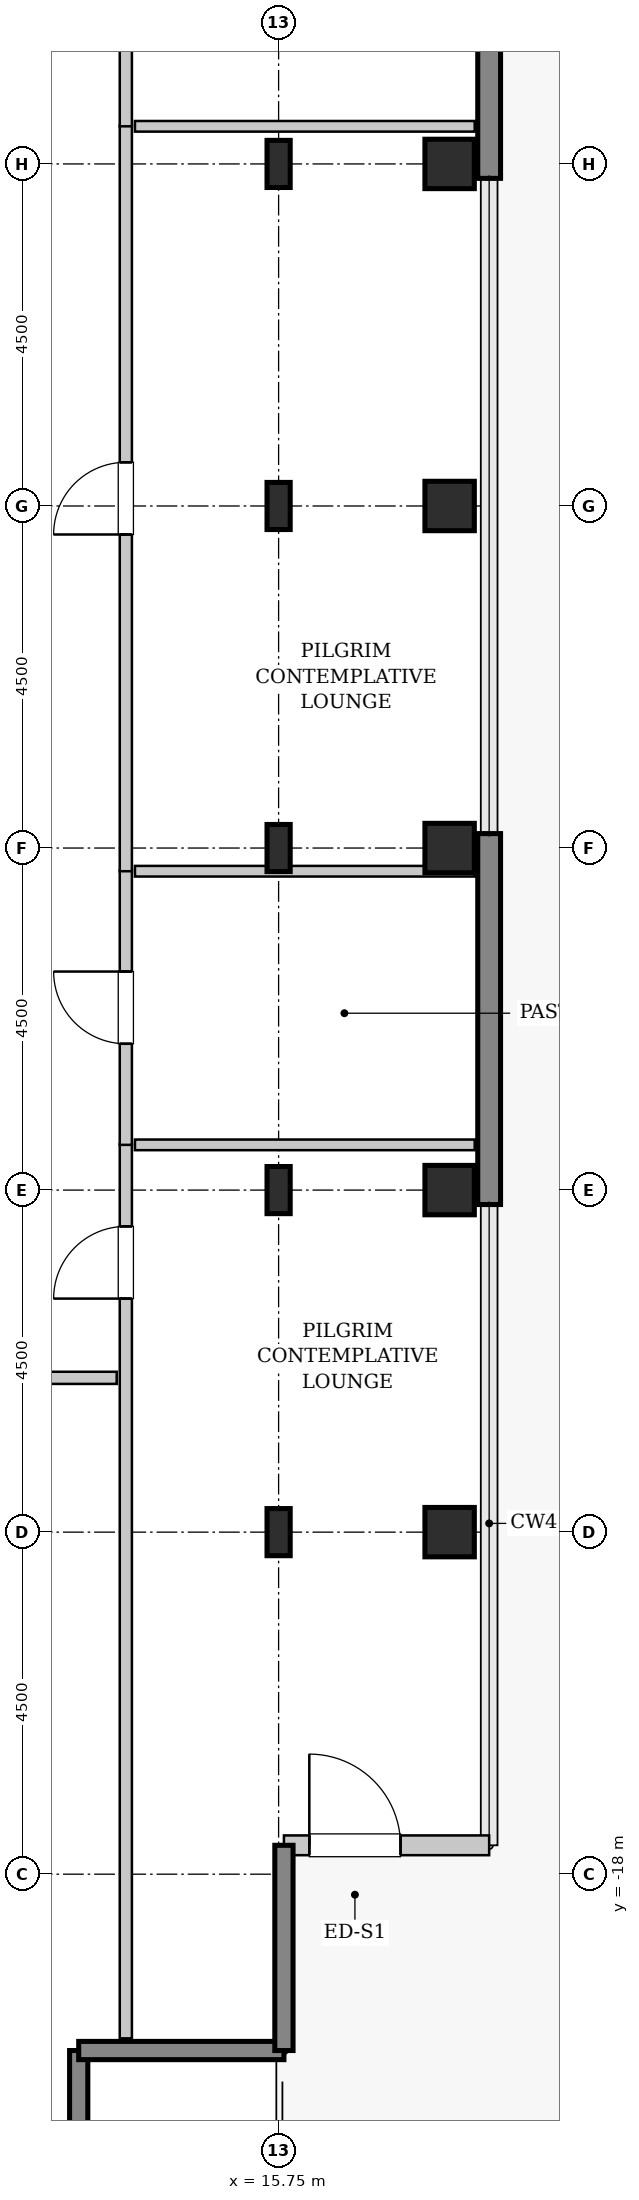
"""IFC4 building model, lengths in metres.
Left out: names, types, materials, properties, quantities, classifications, styles, units other than length and angle.
Written with IfcOpenShell. Run it as: python <this file> out.ifc"""

import sys

from ifc_helpers import new_model, si_unit, direction, frame, frame_2d, origin, origin_2d, place, context, subcontext, project, spatial, rectangle, hollow_rectangle, i_section, extrude, source, transform, mapped, element, fill, save


model = new_model("IFC4")
c1 = context("Model", 3, precision=1e-05, world=origin(), true_north=direction((0.0, 1.0)))
c2 = subcontext(c1, "Body", "Model", "MODEL_VIEW")
j1 = project(units=[si_unit("LENGTHUNIT", "METRE"), si_unit("PLANEANGLEUNIT", "RADIAN")], contexts=[c1])
p1 = place(None, origin())
s1 = spatial("IfcSite", under=j1, at=p1, CompositionType="ELEMENT")
p2 = place(p1, origin())
s2 = spatial("IfcBuilding", under=s1, at=p2, CompositionType="ELEMENT")
p3 = place(p2, frame((0.0, 0.0, 264.6)))
s3 = spatial("IfcBuildingStorey", under=s2, at=p3, CompositionType="ELEMENT", Elevation=264.6)
m1 = source(origin(), c2, "Body", "SweptSolid", [
    extrude(i_section(OverallWidth=0.305, OverallDepth=0.62, WebThickness=0.021, FlangeThickness=0.04, FilletRadius=0.027, at=origin_2d()), origin(), (0.0, 0.0, 1.0), 3.8),
])
for number, where, z_axis, x_axis in (
    (1, (15.75, -13.5, 0.0), (0.0, 0.0, 1.0), (1.0, 0.0, 0.0)),
    (2, (15.75, -9.0, 0.0), (0.0, 0.0, 1.0), (1.0, 0.0, 0.0)),
    (3, (15.75, -4.5, 0.0), (0.0, 0.0, 1.0), (1.0, 0.0, 0.0)),
    (4, (15.75, 0.0, 0.0), (0.0, 0.0, 1.0), (1.0, 0.0, 0.0)),
    (5, (15.75, 4.5, 0.0), (0.0, 0.0, 1.0), (1.0, 0.0, 0.0)),
):
    element("IfcColumn", number, at=place(p3, frame(where, z_axis=z_axis, x_axis=x_axis)), inside=s3, PredefinedType="COLUMN", context=c2, shape_type="MappedRepresentation", body=[
        mapped(m1, transform((0.0, 0.0, 0.0), x_axis=(1.0, 0.0, 0.0), y_axis=(0.0, 1.0, 0.0), z_axis=(0.0, 0.0, 1.0), scale=1.0)),
    ])
m2 = source(origin(), c2, "Body", "SweptSolid", [
    extrude(hollow_rectangle(XDim=0.65, YDim=0.65, WallThickness=0.032, InnerFilletRadius=0.032, OuterFilletRadius=0.064, at=origin_2d()), origin(), (0.0, 0.0, 1.0), 3.8),
])
for number, where, z_axis, x_axis in (
    (6, (18.0, -13.5, 0.0), (0.0, 0.0, 1.0), (1.0, 0.0, 0.0)),
    (7, (18.0, -9.0, 0.0), (0.0, 0.0, 1.0), (1.0, 0.0, 0.0)),
    (8, (18.0, -4.5, 0.0), (0.0, 0.0, 1.0), (1.0, 0.0, 0.0)),
    (9, (18.0, 0.0, 0.0), (0.0, 0.0, 1.0), (1.0, 0.0, 0.0)),
    (10, (18.0, 4.5, 0.0), (0.0, 0.0, 1.0), (1.0, 0.0, 0.0)),
):
    element("IfcColumn", number, at=place(p3, frame(where, z_axis=z_axis, x_axis=x_axis)), inside=s3, PredefinedType="COLUMN", context=c2, shape_type="MappedRepresentation", body=[
        mapped(m2, transform((0.0, 0.0, 0.0), x_axis=(1.0, 0.0, 0.0), y_axis=(0.0, 1.0, 0.0), z_axis=(0.0, 0.0, 1.0), scale=1.0)),
    ])
m3 = source(origin(), c2, "Body", "SweptSolid", [
    extrude(rectangle(XDim=4.88, YDim=0.3, at=frame_2d((2.44, 0.0))), origin(), (0.0, 0.0, 1.0), 3.55),
])
for number, where, z_axis, x_axis in (
    (11, (18.52, -9.19, 0.0), (0.0, 0.0, 1.0), (0.0, 1.0, 0.0)),
    (12, (18.52, 4.31, 0.0), (0.0, 0.0, 1.0), (0.0, 1.0, 0.0)),
):
    element("IfcWall", number, at=place(p3, frame(where, z_axis=z_axis, x_axis=x_axis)), inside=s3, PredefinedType="SHEAR", context=c2, shape_type="MappedRepresentation", body=[
        mapped(m3, transform((0.0, 0.0, 0.0), x_axis=(1.0, 0.0, 0.0), y_axis=(0.0, 1.0, 0.0), z_axis=(0.0, 0.0, 1.0), scale=1.0)),
    ])
m4 = source(origin(), c2, "Body", "SweptSolid", [
    extrude(rectangle(XDim=2.7, YDim=0.26, at=frame_2d((1.35, 0.0))), origin(), (0.0, 0.0, 1.0), 3.55),
])
p4 = place(p3, frame((15.82, -17.62, 0.0), z_axis=(0.0, 0.0, 1.0), x_axis=(1.0, 0.0, 0.0)))
e13 = element("IfcWall", 13, at=p4, inside=s3, PredefinedType="SOLIDWALL", context=c2, shape_type="MappedRepresentation", body=[
    mapped(m4, transform((0.0, 0.0, 0.0), x_axis=(1.0, 0.0, 0.0), y_axis=(0.0, 1.0, 0.0), z_axis=(0.0, 0.0, 1.0), scale=1.0)),
])
p5 = place(p4, frame((0.334, 0.0, 0.0)))
e14 = element("IfcOpeningElement", 14, at=p5, cuts=e13, PredefinedType="OPENING", context=c2, shape_type="SweptSolid", body=[
    extrude(rectangle(XDim=1.2, YDim=2.2, at=frame_2d((0.6, 1.1))), frame((0.0, 0.14, 0.0), z_axis=(0.0, -1.0, 0.0), x_axis=(1.0, 0.0, 0.0)), (0.0, 0.0, 1.0), 0.28),
])
m5 = source(origin(), c2, "Body", "SweptSolid", [
    extrude(rectangle(XDim=2.7, YDim=0.24, at=frame_2d((1.35, 0.0))), origin(), (0.0, 0.0, 1.0), 3.55),
])
for number, where, z_axis, x_axis in (
    (15, (13.12, -23.02, 0.0), (0.0, 0.0, 1.0), (0.0, 1.0, 0.0)),
    (16, (13.12, -20.32, 0.0), (0.0, 0.0, 1.0), (1.0, 0.0, 0.0)),
    (17, (15.82, -20.32, 0.0), (0.0, 0.0, 1.0), (0.0, 1.0, 0.0)),
):
    element("IfcWall", number, at=place(p3, frame(where, z_axis=z_axis, x_axis=x_axis)), inside=s3, PredefinedType="SHEAR", context=c2, shape_type="MappedRepresentation", body=[
        mapped(m5, transform((0.0, 0.0, 0.0), x_axis=(1.0, 0.0, 0.0), y_axis=(0.0, 1.0, 0.0), z_axis=(0.0, 0.0, 1.0), scale=1.0)),
    ])
m6 = source(origin(), c2, "Body", "SweptSolid", [
    extrude(rectangle(XDim=11.765, YDim=0.16, at=frame_2d((5.882, 0.0))), origin(), (0.0, 0.0, 1.0), 3.535),
])
p6 = place(p3, frame((13.74, -20.16, 0.0), z_axis=(0.0, 0.0, 1.0), x_axis=(0.0, 1.0, 0.0)))
e18 = element("IfcWall", 18, at=p6, inside=s3, PredefinedType="PARTITIONING", context=c2, shape_type="MappedRepresentation", body=[
    mapped(m6, transform((0.0, 0.0, 0.0), x_axis=(1.0, 0.0, 0.0), y_axis=(0.0, 1.0, 0.0), z_axis=(0.0, 0.0, 1.0), scale=1.0)),
])
p7 = place(p6, frame((9.732, 0.0, 0.0)))
e19 = element("IfcOpeningElement", 19, at=p7, cuts=e18, PredefinedType="OPENING", context=c2, shape_type="SweptSolid", body=[
    extrude(rectangle(XDim=0.95, YDim=2.1, at=frame_2d((0.475, 1.05))), frame((0.0, 0.09, 0.0), z_axis=(0.0, -1.0, 0.0), x_axis=(1.0, 0.0, 0.0)), (0.0, 0.0, 1.0), 0.18),
])
m7 = source(origin(), c2, "Body", "SweptSolid", [
    extrude(rectangle(XDim=4.47, YDim=0.14, at=frame_2d((2.235, 0.0))), origin(), (0.0, 0.0, 1.0), 3.535),
])
p8 = place(p3, frame((13.86, -8.405, 0.0), z_axis=(0.0, 0.0, 1.0), x_axis=(1.0, 0.0, 0.0)))
e20 = element("IfcWall", 20, at=p8, inside=s3, PredefinedType="PARTITIONING", context=c2, shape_type="MappedRepresentation", body=[
    mapped(m7, transform((0.0, 0.0, 0.0), x_axis=(1.0, 0.0, 0.0), y_axis=(0.0, 1.0, 0.0), z_axis=(0.0, 0.0, 1.0), scale=1.0)),
])
m8 = source(origin(), c2, "Body", "SweptSolid", [
    extrude(rectangle(XDim=3.61, YDim=0.16, at=frame_2d((1.805, 0.0))), origin(), (0.0, 0.0, 1.0), 3.535),
])
p9 = place(p3, frame((13.74, -8.405, 0.0), z_axis=(0.0, 0.0, 1.0), x_axis=(0.0, 1.0, 0.0)))
e21 = element("IfcWall", 21, at=p9, inside=s3, PredefinedType="PARTITIONING", context=c2, shape_type="MappedRepresentation", body=[
    mapped(m8, transform((0.0, 0.0, 0.0), x_axis=(1.0, 0.0, 0.0), y_axis=(0.0, 1.0, 0.0), z_axis=(0.0, 0.0, 1.0), scale=1.0)),
])
p10 = place(p9, frame((1.33, 0.0, 0.0)))
e22 = element("IfcOpeningElement", 22, at=p10, cuts=e21, PredefinedType="OPENING", context=c2, shape_type="SweptSolid", body=[
    extrude(rectangle(XDim=0.95, YDim=2.1, at=frame_2d((0.475, 1.05))), frame((0.0, 0.09, 0.0), z_axis=(0.0, -1.0, 0.0), x_axis=(1.0, 0.0, 0.0)), (0.0, 0.0, 1.0), 0.18),
])
m9 = source(origin(), c2, "Body", "SweptSolid", [
    extrude(rectangle(XDim=4.47, YDim=0.14, at=frame_2d((2.235, 0.0))), origin(), (0.0, 0.0, 1.0), 2.925),
])
p11 = place(p3, frame((13.86, -4.805, 0.0), z_axis=(0.0, 0.0, 1.0), x_axis=(1.0, 0.0, 0.0)))
e23 = element("IfcWall", 23, at=p11, inside=s3, PredefinedType="PARTITIONING", context=c2, shape_type="MappedRepresentation", body=[
    mapped(m9, transform((0.0, 0.0, 0.0), x_axis=(1.0, 0.0, 0.0), y_axis=(0.0, 1.0, 0.0), z_axis=(0.0, 0.0, 1.0), scale=1.0)),
])
m10 = source(origin(), c2, "Body", "SweptSolid", [
    extrude(rectangle(XDim=9.81, YDim=0.16, at=frame_2d((4.905, 0.0))), origin(), (0.0, 0.0, 1.0), 3.535),
])
p12 = place(p3, frame((13.74, -4.805, 0.0), z_axis=(0.0, 0.0, 1.0), x_axis=(0.0, 1.0, 0.0)))
e24 = element("IfcWall", 24, at=p12, inside=s3, PredefinedType="PARTITIONING", context=c2, shape_type="MappedRepresentation", body=[
    mapped(m10, transform((0.0, 0.0, 0.0), x_axis=(1.0, 0.0, 0.0), y_axis=(0.0, 1.0, 0.0), z_axis=(0.0, 0.0, 1.0), scale=1.0)),
])
p13 = place(p12, frame((4.43, 0.0, 0.0)))
e25 = element("IfcOpeningElement", 25, at=p13, cuts=e24, PredefinedType="OPENING", context=c2, shape_type="SweptSolid", body=[
    extrude(rectangle(XDim=0.95, YDim=2.1, at=frame_2d((0.475, 1.05))), frame((0.0, 0.09, 0.0), z_axis=(0.0, -1.0, 0.0), x_axis=(1.0, 0.0, 0.0)), (0.0, 0.0, 1.0), 0.18),
])
p14 = place(p3, frame((13.86, 4.995, 0.0), z_axis=(0.0, 0.0, 1.0), x_axis=(1.0, 0.0, 0.0)))
e26 = element("IfcWall", 26, at=p14, inside=s3, PredefinedType="PARTITIONING", context=c2, shape_type="MappedRepresentation", body=[
    mapped(m9, transform((0.0, 0.0, 0.0), x_axis=(1.0, 0.0, 0.0), y_axis=(0.0, 1.0, 0.0), z_axis=(0.0, 0.0, 1.0), scale=1.0)),
])
m11 = source(origin(), c2, "Body", "SweptSolid", [
    extrude(rectangle(XDim=3.51, YDim=0.16, at=frame_2d((1.755, 0.0))), origin(), (0.0, 0.0, 1.0), 3.535),
])
p15 = place(p3, frame((13.74, 4.995, 0.0), z_axis=(0.0, 0.0, 1.0), x_axis=(0.0, 1.0, 0.0)))
e27 = element("IfcWall", 27, at=p15, inside=s3, PredefinedType="PARTITIONING", context=c2, shape_type="MappedRepresentation", body=[
    mapped(m11, transform((0.0, 0.0, 0.0), x_axis=(1.0, 0.0, 0.0), y_axis=(0.0, 1.0, 0.0), z_axis=(0.0, 0.0, 1.0), scale=1.0)),
])
p16 = place(p15, frame((1.28, 0.0, 0.0)))
e28 = element("IfcOpeningElement", 28, at=p16, cuts=e27, PredefinedType="OPENING", context=c2, shape_type="SweptSolid", body=[
    extrude(rectangle(XDim=0.95, YDim=2.1, at=frame_2d((0.475, 1.05))), frame((0.0, 0.09, 0.0), z_axis=(0.0, -1.0, 0.0), x_axis=(1.0, 0.0, 0.0)), (0.0, 0.0, 1.0), 0.18),
])
m12 = source(origin(), c2, "Body", "SweptSolid", [
    extrude(rectangle(XDim=5.225, YDim=0.16, at=frame_2d((2.613, 0.0))), origin(), (0.0, 0.0, 1.0), 3.535),
])
p17 = place(p3, frame((8.395, -11.47, 0.0), z_axis=(0.0, 0.0, 1.0), x_axis=(1.0, 0.0, 0.0)))
e29 = element("IfcWall", 29, at=p17, inside=s3, PredefinedType="PARTITIONING", context=c2, shape_type="MappedRepresentation", body=[
    mapped(m12, transform((0.0, 0.0, 0.0), x_axis=(1.0, 0.0, 0.0), y_axis=(0.0, 1.0, 0.0), z_axis=(0.0, 0.0, 1.0), scale=1.0)),
])
p18 = place(p17, frame((2.137, 0.0, 0.0)))
e30 = element("IfcOpeningElement", 30, at=p18, cuts=e29, PredefinedType="OPENING", context=c2, shape_type="SweptSolid", body=[
    extrude(rectangle(XDim=0.95, YDim=2.1, at=frame_2d((0.475, 1.05))), frame((0.0, 0.09, 0.0), z_axis=(0.0, -1.0, 0.0), x_axis=(1.0, 0.0, 0.0)), (0.0, 0.0, 1.0), 0.18),
])
m13 = source(origin(), c2, "Body", "SweptSolid", [
    extrude(rectangle(XDim=1.2, YDim=2.2, at=frame_2d((0.6, 1.1))), frame((0.0, 0.025, 0.0), z_axis=(0.0, -1.0, 0.0), x_axis=(1.0, 0.0, 0.0)), (0.0, 0.0, 1.0), 0.05),
])
p19 = place(p5, origin())
e31 = element("IfcDoor", 31, at=p19, inside=s3, OperationType="SINGLE_SWING_LEFT", PredefinedType="DOOR", context=c2, shape_type="MappedRepresentation", body=[
    mapped(m13, transform((0.0, 0.0, 0.0), x_axis=(1.0, 0.0, 0.0), y_axis=(0.0, 1.0, 0.0), z_axis=(0.0, 0.0, 1.0), scale=1.0)),
])
fill(e14, e31)
m14 = source(origin(), c2, "Body", "SweptSolid", [
    extrude(rectangle(XDim=0.95, YDim=2.1, at=frame_2d((0.475, 1.05))), frame((0.0, 0.025, 0.0), z_axis=(0.0, -1.0, 0.0), x_axis=(1.0, 0.0, 0.0)), (0.0, 0.0, 1.0), 0.05),
])
p20 = place(p7, origin())
e32 = element("IfcDoor", 32, at=p20, inside=s3, OperationType="SINGLE_SWING_LEFT", PredefinedType="DOOR", context=c2, shape_type="MappedRepresentation", body=[
    mapped(m14, transform((0.0, 0.0, 0.0), x_axis=(1.0, 0.0, 0.0), y_axis=(0.0, 1.0, 0.0), z_axis=(0.0, 0.0, 1.0), scale=1.0)),
])
fill(e19, e32)
p21 = place(p10, origin())
e33 = element("IfcDoor", 33, at=p21, inside=s3, OperationType="SINGLE_SWING_RIGHT", PredefinedType="DOOR", context=c2, shape_type="MappedRepresentation", body=[
    mapped(m14, transform((0.0, 0.0, 0.0), x_axis=(1.0, 0.0, 0.0), y_axis=(0.0, 1.0, 0.0), z_axis=(0.0, 0.0, 1.0), scale=1.0)),
])
fill(e22, e33)
p22 = place(p13, origin())
e34 = element("IfcDoor", 34, at=p22, inside=s3, OperationType="SINGLE_SWING_LEFT", PredefinedType="DOOR", context=c2, shape_type="MappedRepresentation", body=[
    mapped(m14, transform((0.0, 0.0, 0.0), x_axis=(1.0, 0.0, 0.0), y_axis=(0.0, 1.0, 0.0), z_axis=(0.0, 0.0, 1.0), scale=1.0)),
])
fill(e25, e34)
save(model, sys.argv[1])
